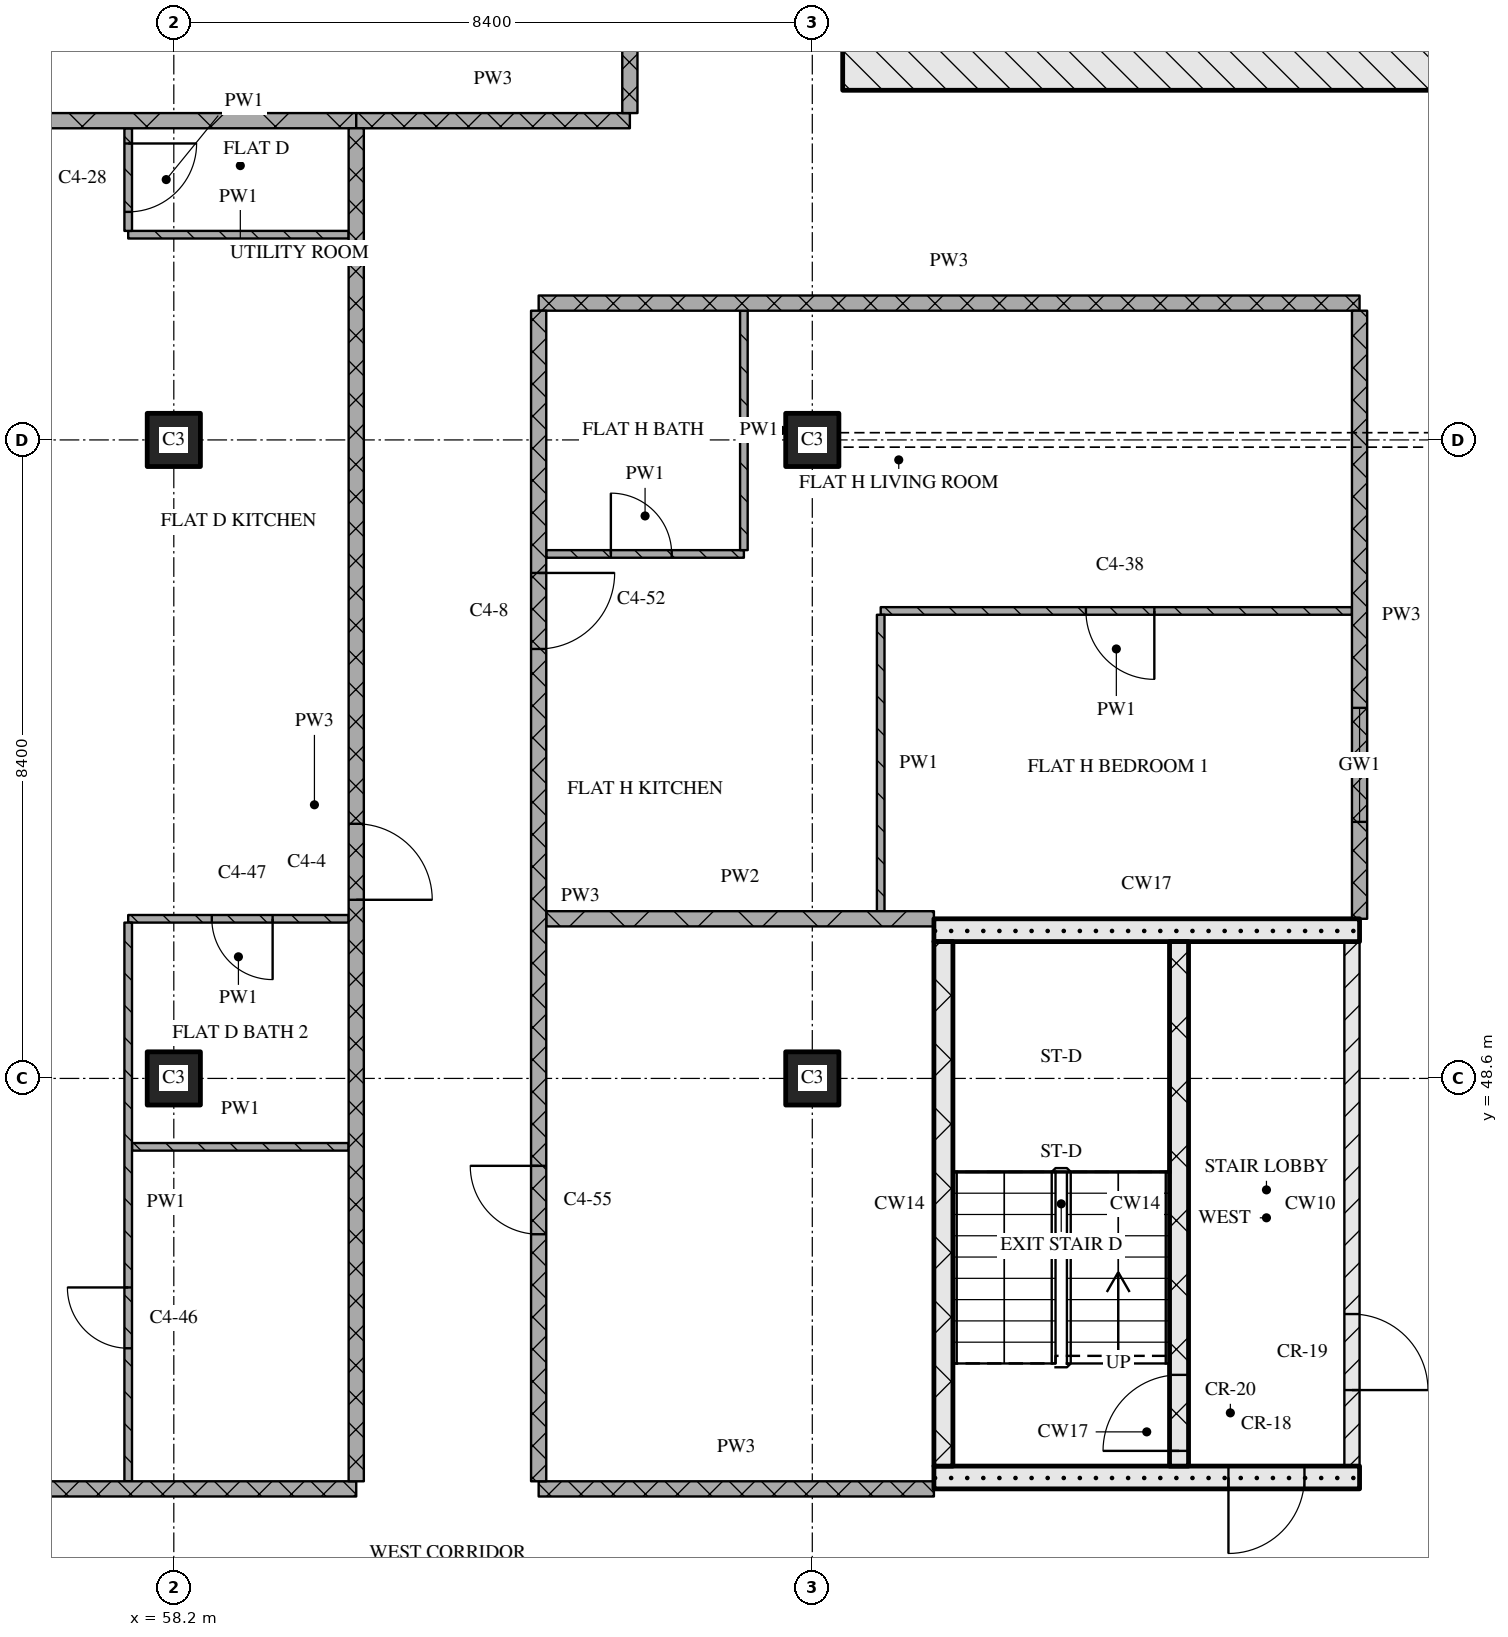
"""IFC4 building model, lengths in metres.
Left out: names, types, materials, properties, quantities, classifications, styles, units other than length and angle.
Written with IfcOpenShell. Run it as: python <this file> out.ifc"""

import sys

from ifc_helpers import new_model, si_unit, direction, frame, frame_2d, origin, origin_2d, place, context, subcontext, project, spatial, rectangle, extrude, element, fill, save


model = new_model("IFC4")
c1 = context("Model", 3, precision=1e-05, world=origin(), true_north=direction((0.0, 1.0)))
c2 = subcontext(c1, "Body", "Model", "MODEL_VIEW")
j1 = project(units=[si_unit("LENGTHUNIT", "METRE"), si_unit("PLANEANGLEUNIT", "RADIAN")], contexts=[c1])
p1 = place(None, origin())
s1 = spatial("IfcSite", under=j1, at=p1, CompositionType="ELEMENT")
p2 = place(p1, origin())
s2 = spatial("IfcBuilding", under=s1, at=p2, CompositionType="ELEMENT")
p3 = place(p2, frame((0.0, 0.0, 187.05)))
s3 = spatial("IfcBuildingStorey", under=s2, at=p3, CompositionType="ELEMENT", Elevation=187.05)
for number, where, z_axis, x_axis in (
    (1, (58.2, 48.6, 0.0), (0.0, 0.0, 1.0), (1.0, 0.0, 0.0)),
    (2, (58.2, 57.0, 0.0), (0.0, 0.0, 1.0), (1.0, 0.0, 0.0)),
    (3, (66.6, 48.6, 0.0), (0.0, 0.0, 1.0), (1.0, 0.0, 0.0)),
    (4, (66.6, 57.0, 0.0), (0.0, 0.0, 1.0), (1.0, 0.0, 0.0)),
):
    element("IfcColumn", number, at=place(p3, frame(where, z_axis=z_axis, x_axis=x_axis)), inside=s3, PredefinedType="COLUMN", context=c2, shape_type="SweptSolid", body=[
        extrude(rectangle(XDim=0.7, YDim=0.7, at=origin_2d()), origin(), (0.0, 0.0, 1.0), 3.6),
    ])
p4 = place(p3, frame((67.0, 62.0, 0.0), z_axis=(0.0, 0.0, 1.0), x_axis=(1.0, 0.0, 0.0)))
e5 = element("IfcWall", 5, at=p4, inside=s3, PredefinedType="SOLIDWALL", context=c2, shape_type="SweptSolid", body=[
    extrude(rectangle(XDim=41.2, YDim=0.8, at=frame_2d((20.6, 0.0))), origin(), (0.0, 0.0, 1.0), 3.32),
])
p5 = place(p4, frame((20.95, 0.0, 0.0)))
e6 = element("IfcOpeningElement", 6, at=p5, cuts=e5, PredefinedType="OPENING", context=c2, shape_type="SweptSolid", body=[
    extrude(rectangle(XDim=1.8, YDim=2.1, at=frame_2d((0.9, 1.05))), frame((0.0, 0.41, 0.0), z_axis=(0.0, -1.0, 0.0), x_axis=(1.0, 0.0, 0.0)), (0.0, 0.0, 1.0), 0.82),
])
p6 = place(p3, frame((68.2, 43.35, 0.0), z_axis=(0.0, 0.0, 1.0), x_axis=(1.0, 0.0, 0.0)))
e7 = element("IfcWall", 7, at=p6, inside=s3, PredefinedType="SOLIDWALL", context=c2, shape_type="SweptSolid", body=[
    extrude(rectangle(XDim=5.6, YDim=0.3, at=frame_2d((2.8, 0.0))), origin(), (0.0, 0.0, 1.0), 3.32),
])
p7 = place(p6, frame((3.875, 0.0, 0.0)))
e8 = element("IfcOpeningElement", 8, at=p7, cuts=e7, PredefinedType="OPENING", context=c2, shape_type="SweptSolid", body=[
    extrude(rectangle(XDim=1.0, YDim=2.1, at=frame_2d((0.5, 1.05))), frame((0.0, 0.16, 0.0), z_axis=(0.0, -1.0, 0.0), x_axis=(1.0, 0.0, 0.0)), (0.0, 0.0, 1.0), 0.32),
])
p8 = place(p3, frame((68.325, 43.5, 0.0), z_axis=(0.0, 0.0, 1.0), x_axis=(0.0, 1.0, 0.0)))
e9 = element("IfcWall", 9, at=p8, inside=s3, PredefinedType="SOLIDWALL", context=c2, shape_type="SweptSolid", body=[
    extrude(rectangle(XDim=6.9, YDim=0.25, at=frame_2d((3.45, 0.0))), origin(), (0.0, 0.0, 1.0), 3.32),
])
p9 = place(p3, frame((71.425, 43.5, 0.0), z_axis=(0.0, 0.0, 1.0), x_axis=(0.0, 1.0, 0.0)))
e10 = element("IfcWall", 10, at=p9, inside=s3, PredefinedType="SOLIDWALL", context=c2, shape_type="SweptSolid", body=[
    extrude(rectangle(XDim=6.9, YDim=0.25, at=frame_2d((3.45, 0.0))), origin(), (0.0, 0.0, 1.0), 3.32),
])
p10 = place(p9, frame((0.2, 0.0, 0.0)))
e11 = element("IfcOpeningElement", 11, at=p10, cuts=e10, PredefinedType="OPENING", context=c2, shape_type="SweptSolid", body=[
    extrude(rectangle(XDim=1.0, YDim=2.1, at=frame_2d((0.5, 1.05))), frame((0.0, 0.135, 0.0), z_axis=(0.0, -1.0, 0.0), x_axis=(1.0, 0.0, 0.0)), (0.0, 0.0, 1.0), 0.27),
])
p11 = place(p3, frame((73.7, 43.5, 0.0), z_axis=(0.0, 0.0, 1.0), x_axis=(0.0, 1.0, 0.0)))
e12 = element("IfcWall", 12, at=p11, inside=s3, PredefinedType="PARTITIONING", context=c2, shape_type="SweptSolid", body=[
    extrude(rectangle(XDim=6.9, YDim=0.2, at=frame_2d((3.45, 0.0))), origin(), (0.0, 0.0, 1.0), 3.32),
])
p12 = place(p11, frame((1.0, 0.0, 0.0)))
e13 = element("IfcOpeningElement", 13, at=p12, cuts=e12, PredefinedType="OPENING", context=c2, shape_type="SweptSolid", body=[
    extrude(rectangle(XDim=1.0, YDim=2.1, at=frame_2d((0.5, 1.05))), frame((0.0, 0.11, 0.0), z_axis=(0.0, -1.0, 0.0), x_axis=(1.0, 0.0, 0.0)), (0.0, 0.0, 1.0), 0.22),
])
p13 = place(p3, frame((68.2, 50.55, 0.0), z_axis=(0.0, 0.0, 1.0), x_axis=(1.0, 0.0, 0.0)))
e14 = element("IfcWall", 14, at=p13, inside=s3, PredefinedType="SOLIDWALL", context=c2, shape_type="SweptSolid", body=[
    extrude(rectangle(XDim=5.6, YDim=0.3, at=frame_2d((2.8, 0.0))), origin(), (0.0, 0.0, 1.0), 3.32),
])
p14 = place(p3, frame((48.28, 43.2, 0.0), z_axis=(0.0, 0.0, 1.0), x_axis=(1.0, 0.0, 0.0)))
e15 = element("IfcWall", 15, at=p14, inside=s3, PredefinedType="PARTITIONING", context=c2, shape_type="SweptSolid", body=[
    extrude(rectangle(XDim=12.32, YDim=0.2, at=frame_2d((6.16, 0.0))), origin(), (0.0, 0.0, 1.0), 3.32),
])
p15 = place(p3, frame((63.0, 43.2, 0.0), z_axis=(0.0, 0.0, 1.0), x_axis=(1.0, 0.0, 0.0)))
e16 = element("IfcWall", 16, at=p15, inside=s3, PredefinedType="PARTITIONING", context=c2, shape_type="SweptSolid", body=[
    extrude(rectangle(XDim=5.2, YDim=0.2, at=frame_2d((2.6, 0.0))), origin(), (0.0, 0.0, 1.0), 3.32),
])
p16 = place(p3, frame((57.65, 47.7, 0.0), z_axis=(0.0, 0.0, 1.0), x_axis=(1.0, 0.0, 0.0)))
e17 = element("IfcWall", 17, at=p16, inside=s3, PredefinedType="PARTITIONING", context=c2, shape_type="SweptSolid", body=[
    extrude(rectangle(XDim=2.85, YDim=0.1, at=frame_2d((1.425, 0.0))), origin(), (0.0, 0.0, 1.0), 3.32),
])
p17 = place(p3, frame((63.1, 50.7, 0.0), z_axis=(0.0, 0.0, 1.0), x_axis=(1.0, 0.0, 0.0)))
e18 = element("IfcWall", 18, at=p17, inside=s3, PredefinedType="PARTITIONING", context=c2, shape_type="SweptSolid", body=[
    extrude(rectangle(XDim=5.1, YDim=0.2, at=frame_2d((2.55, 0.0))), origin(), (0.0, 0.0, 1.0), 3.32),
])
p18 = place(p3, frame((60.5, 50.7, 0.0), z_axis=(0.0, 0.0, 1.0), x_axis=(-1.0, 0.0, 0.0)))
e19 = element("IfcWall", 19, at=p18, inside=s3, PredefinedType="PARTITIONING", context=c2, shape_type="SweptSolid", body=[
    extrude(rectangle(XDim=2.9, YDim=0.1, at=frame_2d((1.45, 0.0))), origin(), (0.0, 0.0, 1.0), 3.32),
])
p19 = place(p18, frame((1.0, 0.0, 0.0)))
e20 = element("IfcOpeningElement", 20, at=p19, cuts=e19, PredefinedType="OPENING", context=c2, shape_type="SweptSolid", body=[
    extrude(rectangle(XDim=0.8, YDim=2.1, at=frame_2d((0.4, 1.05))), frame((0.0, 0.06, 0.0), z_axis=(0.0, -1.0, 0.0), x_axis=(1.0, 0.0, 0.0)), (0.0, 0.0, 1.0), 0.12),
])
p20 = place(p3, frame((73.7, 54.75, 0.0), z_axis=(0.0, 0.0, 1.0), x_axis=(-1.0, 0.0, 0.0)))
e21 = element("IfcWall", 21, at=p20, inside=s3, PredefinedType="PARTITIONING", context=c2, shape_type="SweptSolid", body=[
    extrude(rectangle(XDim=6.2, YDim=0.1, at=frame_2d((3.1, 0.0))), origin(), (0.0, 0.0, 1.0), 3.32),
])
p21 = place(p20, frame((2.6, 0.0, 0.0)))
e22 = element("IfcOpeningElement", 22, at=p21, cuts=e21, PredefinedType="OPENING", context=c2, shape_type="SweptSolid", body=[
    extrude(rectangle(XDim=0.9, YDim=2.1, at=frame_2d((0.45, 1.05))), frame((0.0, 0.06, 0.0), z_axis=(0.0, -1.0, 0.0), x_axis=(1.0, 0.0, 0.0)), (0.0, 0.0, 1.0), 0.12),
])
p22 = place(p3, frame((63.1, 55.5, 0.0), z_axis=(0.0, 0.0, 1.0), x_axis=(1.0, 0.0, 0.0)))
e23 = element("IfcWall", 23, at=p22, inside=s3, PredefinedType="PARTITIONING", context=c2, shape_type="SweptSolid", body=[
    extrude(rectangle(XDim=2.6, YDim=0.1, at=frame_2d((1.3, 0.0))), origin(), (0.0, 0.0, 1.0), 3.32),
])
p23 = place(p22, frame((0.85, 0.0, 0.0)))
e24 = element("IfcOpeningElement", 24, at=p23, cuts=e23, PredefinedType="OPENING", context=c2, shape_type="SweptSolid", body=[
    extrude(rectangle(XDim=0.8, YDim=2.1, at=frame_2d((0.4, 1.05))), frame((0.0, 0.06, 0.0), z_axis=(0.0, -1.0, 0.0), x_axis=(1.0, 0.0, 0.0)), (0.0, 0.0, 1.0), 0.12),
])
p24 = place(p3, frame((63.0, 58.8, 0.0), z_axis=(0.0, 0.0, 1.0), x_axis=(1.0, 0.0, 0.0)))
e25 = element("IfcWall", 25, at=p24, inside=s3, PredefinedType="PARTITIONING", context=c2, shape_type="SweptSolid", body=[
    extrude(rectangle(XDim=10.8, YDim=0.2, at=frame_2d((5.4, 0.0))), origin(), (0.0, 0.0, 1.0), 3.32),
])
p25 = place(p3, frame((57.6, 59.7, 0.0), z_axis=(0.0, 0.0, 1.0), x_axis=(1.0, 0.0, 0.0)))
e26 = element("IfcWall", 26, at=p25, inside=s3, PredefinedType="PARTITIONING", context=c2, shape_type="SweptSolid", body=[
    extrude(rectangle(XDim=2.9, YDim=0.1, at=frame_2d((1.45, 0.0))), origin(), (0.0, 0.0, 1.0), 3.32),
])
p26 = place(p3, frame((60.6, 61.2, 0.0), z_axis=(0.0, 0.0, 1.0), x_axis=(1.0, 0.0, 0.0)))
e27 = element("IfcWall", 27, at=p26, inside=s3, PredefinedType="PARTITIONING", context=c2, shape_type="SweptSolid", body=[
    extrude(rectangle(XDim=3.6, YDim=0.2, at=frame_2d((1.8, 0.0))), origin(), (0.0, 0.0, 1.0), 3.32),
])
p27 = place(p3, frame((48.28, 61.2, 0.0), z_axis=(0.0, 0.0, 1.0), x_axis=(1.0, 0.0, 0.0)))
e28 = element("IfcWall", 28, at=p27, inside=s3, PredefinedType="PARTITIONING", context=c2, shape_type="SweptSolid", body=[
    extrude(rectangle(XDim=12.32, YDim=0.2, at=frame_2d((6.16, 0.0))), origin(), (0.0, 0.0, 1.0), 3.32),
])
p28 = place(p3, frame((57.6, 50.65, 0.0), z_axis=(0.0, 0.0, 1.0), x_axis=(0.0, -1.0, 0.0)))
e29 = element("IfcWall", 29, at=p28, inside=s3, PredefinedType="PARTITIONING", context=c2, shape_type="SweptSolid", body=[
    extrude(rectangle(XDim=7.35, YDim=0.1, at=frame_2d((3.675, 0.0))), origin(), (0.0, 0.0, 1.0), 3.32),
])
p29 = place(p28, frame((4.8, 0.0, 0.0)))
e30 = element("IfcOpeningElement", 30, at=p29, cuts=e29, PredefinedType="OPENING", context=c2, shape_type="SweptSolid", body=[
    extrude(rectangle(XDim=0.8, YDim=2.1, at=frame_2d((0.4, 1.05))), frame((0.0, 0.06, 0.0), z_axis=(0.0, -1.0, 0.0), x_axis=(1.0, 0.0, 0.0)), (0.0, 0.0, 1.0), 0.12),
])
p30 = place(p3, frame((57.6, 61.1, 0.0), z_axis=(0.0, 0.0, 1.0), x_axis=(0.0, -1.0, 0.0)))
e31 = element("IfcWall", 31, at=p30, inside=s3, PredefinedType="PARTITIONING", context=c2, shape_type="SweptSolid", body=[
    extrude(rectangle(XDim=1.35, YDim=0.1, at=frame_2d((0.675, 0.0))), origin(), (0.0, 0.0, 1.0), 3.32),
])
p31 = place(p30, frame((0.2, 0.0, 0.0)))
e32 = element("IfcOpeningElement", 32, at=p31, cuts=e31, PredefinedType="OPENING", context=c2, shape_type="SweptSolid", body=[
    extrude(rectangle(XDim=0.9, YDim=2.1, at=frame_2d((0.45, 1.05))), frame((0.0, 0.06, 0.0), z_axis=(0.0, -1.0, 0.0), x_axis=(1.0, 0.0, 0.0)), (0.0, 0.0, 1.0), 0.12),
])
p32 = place(p3, frame((60.6, 43.3, 0.0), z_axis=(0.0, 0.0, 1.0), x_axis=(0.0, 1.0, 0.0)))
e33 = element("IfcWall", 33, at=p32, inside=s3, PredefinedType="PARTITIONING", context=c2, shape_type="SweptSolid", body=[
    extrude(rectangle(XDim=17.8, YDim=0.2, at=frame_2d((8.9, 0.0))), origin(), (0.0, 0.0, 1.0), 3.32),
])
p33 = place(p32, frame((7.65, 0.0, 0.0)))
e34 = element("IfcOpeningElement", 34, at=p33, cuts=e33, PredefinedType="OPENING", context=c2, shape_type="SweptSolid", body=[
    extrude(rectangle(XDim=1.0, YDim=2.1, at=frame_2d((0.5, 1.05))), frame((0.0, 0.11, 0.0), z_axis=(0.0, -1.0, 0.0), x_axis=(1.0, 0.0, 0.0)), (0.0, 0.0, 1.0), 0.22),
])
p34 = place(p3, frame((63.0, 58.7, 0.0), z_axis=(0.0, 0.0, 1.0), x_axis=(0.0, -1.0, 0.0)))
e35 = element("IfcWall", 35, at=p34, inside=s3, PredefinedType="PARTITIONING", context=c2, shape_type="SweptSolid", body=[
    extrude(rectangle(XDim=15.4, YDim=0.2, at=frame_2d((7.7, 0.0))), origin(), (0.0, 0.0, 1.0), 3.32),
])
p35 = place(p34, frame((3.45, 0.0, 0.0)))
e36 = element("IfcOpeningElement", 36, at=p35, cuts=e35, PredefinedType="OPENING", context=c2, shape_type="SweptSolid", body=[
    extrude(rectangle(XDim=1.0, YDim=2.1, at=frame_2d((0.5, 1.05))), frame((0.0, 0.11, 0.0), z_axis=(0.0, -1.0, 0.0), x_axis=(1.0, 0.0, 0.0)), (0.0, 0.0, 1.0), 0.22),
])
p36 = place(p34, frame((11.25, 0.0, 0.0)))
e37 = element("IfcOpeningElement", 37, at=p36, cuts=e35, PredefinedType="OPENING", context=c2, shape_type="SweptSolid", body=[
    extrude(rectangle(XDim=0.9, YDim=2.1, at=frame_2d((0.45, 1.05))), frame((0.0, 0.11, 0.0), z_axis=(0.0, -1.0, 0.0), x_axis=(1.0, 0.0, 0.0)), (0.0, 0.0, 1.0), 0.22),
])
p37 = place(p3, frame((64.2, 61.3, 0.0), z_axis=(0.0, 0.0, 1.0), x_axis=(0.0, 1.0, 0.0)))
e38 = element("IfcWall", 38, at=p37, inside=s3, PredefinedType="PARTITIONING", context=c2, shape_type="SweptSolid", body=[
    extrude(rectangle(XDim=14.02, YDim=0.2, at=frame_2d((7.01, 0.0))), origin(), (0.0, 0.0, 1.0), 3.32),
])
p38 = place(p37, frame((3.45, 0.0, 0.0)))
e39 = element("IfcOpeningElement", 39, at=p38, cuts=e38, PredefinedType="OPENING", context=c2, shape_type="SweptSolid", body=[
    extrude(rectangle(XDim=1.0, YDim=2.1, at=frame_2d((0.5, 1.05))), frame((0.0, 0.11, 0.0), z_axis=(0.0, -1.0, 0.0), x_axis=(1.0, 0.0, 0.0)), (0.0, 0.0, 1.0), 0.22),
])
p39 = place(p3, frame((65.7, 58.7, 0.0), z_axis=(0.0, 0.0, 1.0), x_axis=(0.0, -1.0, 0.0)))
e40 = element("IfcWall", 40, at=p39, inside=s3, PredefinedType="PARTITIONING", context=c2, shape_type="SweptSolid", body=[
    extrude(rectangle(XDim=3.15, YDim=0.1, at=frame_2d((1.575, 0.0))), origin(), (0.0, 0.0, 1.0), 3.32),
])
p40 = place(p3, frame((67.5, 54.7, 0.0), z_axis=(0.0, 0.0, 1.0), x_axis=(0.0, -1.0, 0.0)))
e41 = element("IfcWall", 41, at=p40, inside=s3, PredefinedType="PARTITIONING", context=c2, shape_type="SweptSolid", body=[
    extrude(rectangle(XDim=3.9, YDim=0.1, at=frame_2d((1.95, 0.0))), origin(), (0.0, 0.0, 1.0), 3.32),
])
p41 = place(p3, frame((73.8, 58.7, 0.0), z_axis=(0.0, 0.0, 1.0), x_axis=(0.0, -1.0, 0.0)))
e42 = element("IfcWall", 42, at=p41, inside=s3, PredefinedType="PARTITIONING", context=c2, shape_type="SweptSolid", body=[
    extrude(rectangle(XDim=8.0, YDim=0.2, at=frame_2d((4.0, 0.0))), origin(), (0.0, 0.0, 1.0), 3.32),
])
p42 = place(p41, frame((5.225, 0.0, 0.9)))
e43 = element("IfcOpeningElement", 43, at=p42, cuts=e42, PredefinedType="OPENING", context=c2, shape_type="SweptSolid", body=[
    extrude(rectangle(XDim=1.5, YDim=1.5, at=frame_2d((0.75, 0.75))), frame((0.0, 0.11, 0.0), z_axis=(0.0, -1.0, 0.0), x_axis=(1.0, 0.0, 0.0)), (0.0, 0.0, 1.0), 0.22),
])
p43 = place(p7, origin())
e44 = element("IfcDoor", 44, at=p43, inside=s3, OperationType="SINGLE_SWING_RIGHT", PredefinedType="DOOR", context=c2, shape_type="SweptSolid", body=[
    extrude(rectangle(XDim=1.0, YDim=2.1, at=frame_2d((0.5, 1.05))), frame((0.0, 0.025, 0.0), z_axis=(0.0, -1.0, 0.0), x_axis=(1.0, 0.0, 0.0)), (0.0, 0.0, 1.0), 0.05),
])
fill(e8, e44)
p44 = place(p10, origin())
e45 = element("IfcDoor", 45, at=p44, inside=s3, OperationType="SINGLE_SWING_LEFT", PredefinedType="DOOR", context=c2, shape_type="SweptSolid", body=[
    extrude(rectangle(XDim=1.0, YDim=2.1, at=frame_2d((0.5, 1.05))), frame((0.0, 0.025, 0.0), z_axis=(0.0, -1.0, 0.0), x_axis=(1.0, 0.0, 0.0)), (0.0, 0.0, 1.0), 0.05),
])
fill(e11, e45)
p45 = place(p12, origin())
e46 = element("IfcDoor", 46, at=p45, inside=s3, OperationType="SINGLE_SWING_RIGHT", PredefinedType="DOOR", context=c2, shape_type="SweptSolid", body=[
    extrude(rectangle(XDim=1.0, YDim=2.1, at=frame_2d((0.5, 1.05))), frame((0.0, 0.025, 0.0), z_axis=(0.0, -1.0, 0.0), x_axis=(1.0, 0.0, 0.0)), (0.0, 0.0, 1.0), 0.05),
])
fill(e13, e46)
p46 = place(p19, origin())
e47 = element("IfcDoor", 47, at=p46, inside=s3, OperationType="SINGLE_SWING_LEFT", PredefinedType="DOOR", context=c2, shape_type="SweptSolid", body=[
    extrude(rectangle(XDim=0.8, YDim=2.1, at=frame_2d((0.4, 1.05))), frame((0.0, 0.025, 0.0), z_axis=(0.0, -1.0, 0.0), x_axis=(1.0, 0.0, 0.0)), (0.0, 0.0, 1.0), 0.05),
])
fill(e20, e47)
p47 = place(p21, origin())
e48 = element("IfcDoor", 48, at=p47, inside=s3, OperationType="SINGLE_SWING_LEFT", PredefinedType="DOOR", context=c2, shape_type="SweptSolid", body=[
    extrude(rectangle(XDim=0.9, YDim=2.1, at=frame_2d((0.45, 1.05))), frame((0.0, 0.025, 0.0), z_axis=(0.0, -1.0, 0.0), x_axis=(1.0, 0.0, 0.0)), (0.0, 0.0, 1.0), 0.05),
])
fill(e22, e48)
p48 = place(p23, origin())
e49 = element("IfcDoor", 49, at=p48, inside=s3, OperationType="SINGLE_SWING_LEFT", PredefinedType="DOOR", context=c2, shape_type="SweptSolid", body=[
    extrude(rectangle(XDim=0.8, YDim=2.1, at=frame_2d((0.4, 1.05))), frame((0.0, 0.025, 0.0), z_axis=(0.0, -1.0, 0.0), x_axis=(1.0, 0.0, 0.0)), (0.0, 0.0, 1.0), 0.05),
])
fill(e24, e49)
p49 = place(p29, origin())
e50 = element("IfcDoor", 50, at=p49, inside=s3, OperationType="SINGLE_SWING_RIGHT", PredefinedType="DOOR", context=c2, shape_type="SweptSolid", body=[
    extrude(rectangle(XDim=0.8, YDim=2.1, at=frame_2d((0.4, 1.05))), frame((0.0, 0.025, 0.0), z_axis=(0.0, -1.0, 0.0), x_axis=(1.0, 0.0, 0.0)), (0.0, 0.0, 1.0), 0.05),
])
fill(e30, e50)
p50 = place(p31, origin())
e51 = element("IfcDoor", 51, at=p50, inside=s3, OperationType="SINGLE_SWING_LEFT", PredefinedType="DOOR", context=c2, shape_type="SweptSolid", body=[
    extrude(rectangle(XDim=0.9, YDim=2.1, at=frame_2d((0.45, 1.05))), frame((0.0, 0.025, 0.0), z_axis=(0.0, -1.0, 0.0), x_axis=(1.0, 0.0, 0.0)), (0.0, 0.0, 1.0), 0.05),
])
fill(e32, e51)
p51 = place(p33, origin())
e52 = element("IfcDoor", 52, at=p51, inside=s3, OperationType="SINGLE_SWING_RIGHT", PredefinedType="DOOR", context=c2, shape_type="SweptSolid", body=[
    extrude(rectangle(XDim=1.0, YDim=2.1, at=frame_2d((0.5, 1.05))), frame((0.0, 0.025, 0.0), z_axis=(0.0, -1.0, 0.0), x_axis=(1.0, 0.0, 0.0)), (0.0, 0.0, 1.0), 0.05),
])
fill(e34, e52)
p52 = place(p35, origin())
e53 = element("IfcDoor", 53, at=p52, inside=s3, OperationType="SINGLE_SWING_LEFT", PredefinedType="DOOR", context=c2, shape_type="SweptSolid", body=[
    extrude(rectangle(XDim=1.0, YDim=2.1, at=frame_2d((0.5, 1.05))), frame((0.0, 0.025, 0.0), z_axis=(0.0, -1.0, 0.0), x_axis=(1.0, 0.0, 0.0)), (0.0, 0.0, 1.0), 0.05),
])
fill(e36, e53)
p53 = place(p36, origin())
e54 = element("IfcDoor", 54, at=p53, inside=s3, OperationType="SINGLE_SWING_RIGHT", PredefinedType="DOOR", context=c2, shape_type="SweptSolid", body=[
    extrude(rectangle(XDim=0.9, YDim=2.1, at=frame_2d((0.45, 1.05))), frame((0.0, 0.025, 0.0), z_axis=(0.0, -1.0, 0.0), x_axis=(1.0, 0.0, 0.0)), (0.0, 0.0, 1.0), 0.05),
])
fill(e37, e54)
p54 = place(p42, origin())
e55 = element("IfcWindow", 55, at=p54, inside=s3, PartitioningType="SINGLE_PANEL", PredefinedType="WINDOW", context=c2, shape_type="SweptSolid", body=[
    extrude(rectangle(XDim=1.5, YDim=1.5, at=frame_2d((0.75, 0.75))), frame((0.0, 0.03, 0.0), z_axis=(0.0, -1.0, 0.0), x_axis=(1.0, 0.0, 0.0)), (0.0, 0.0, 1.0), 0.06),
])
fill(e43, e55)
save(model, sys.argv[1])
